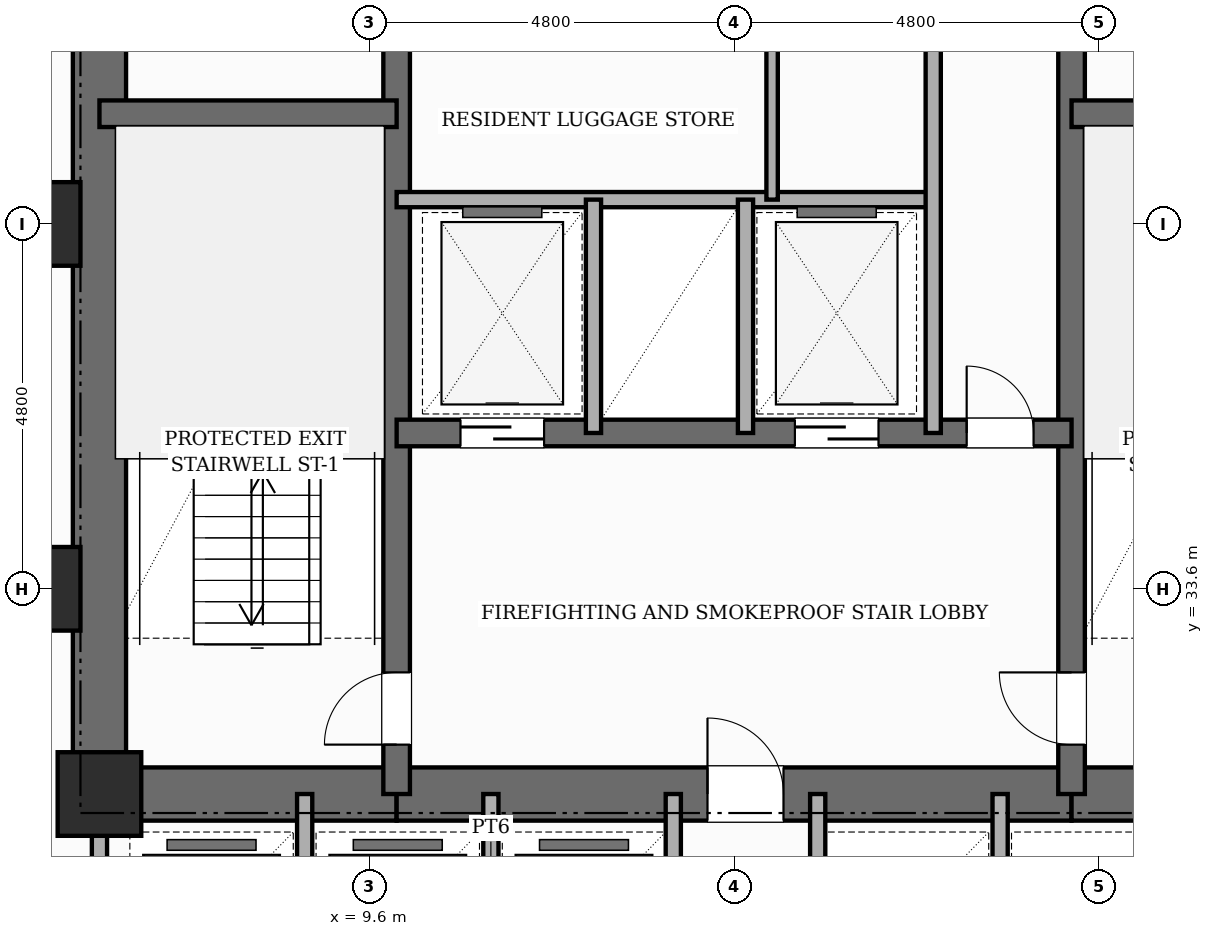
"""IFC4 building model, lengths in metres.
Left out: names, types, materials, properties, quantities, classifications, styles, units other than length and angle.
Written with IfcOpenShell. Run it as: python <this file> out.ifc"""

import sys

from ifc_helpers import new_model, si_unit, direction, frame, frame_2d, origin, origin_2d, place, context, subcontext, project, spatial, rectangle, extrude, element, fill, save


model = new_model("IFC4")
c1 = context("Model", 3, precision=1e-05, world=origin(), true_north=direction((0.0, 1.0)))
c2 = subcontext(c1, "Body", "Model", "MODEL_VIEW")
j1 = project(units=[si_unit("LENGTHUNIT", "METRE"), si_unit("PLANEANGLEUNIT", "RADIAN")], contexts=[c1])
p1 = place(None, origin())
s1 = spatial("IfcSite", under=j1, at=p1, CompositionType="ELEMENT")
p2 = place(p1, origin())
s2 = spatial("IfcBuilding", under=s1, at=p2, CompositionType="ELEMENT")
p3 = place(p2, frame((0.0, 0.0, 57.4)))
s3 = spatial("IfcBuildingStorey", under=s2, at=p3, CompositionType="ELEMENT", Elevation=57.4)
p4 = place(p3, frame((6.05, 30.55, 0.0), z_axis=(0.0, 0.0, 1.0), x_axis=(0.0, 1.0, 0.0)))
e1 = element("IfcWall", 1, at=p4, inside=s3, PredefinedType="SHEAR", context=c2, shape_type="SweptSolid", body=[
    extrude(rectangle(XDim=15.6, YDim=0.7, at=frame_2d((7.8, 0.0))), origin(), (0.0, 0.0, 1.0), 3.6),
])
p5 = place(p3, frame((6.05, 30.9, 0.0), z_axis=(0.0, 0.0, 1.0), x_axis=(1.0, 0.0, 0.0)))
e2 = element("IfcWall", 2, at=p5, inside=s3, PredefinedType="SHEAR", context=c2, shape_type="SweptSolid", body=[
    extrude(rectangle(XDim=3.91, YDim=0.7, at=frame_2d((1.955, 0.0))), origin(), (0.0, 0.0, 1.0), 3.6),
])
p6 = place(p3, frame((9.96, 30.9, 0.0), z_axis=(0.0, 0.0, 1.0), x_axis=(1.0, 0.0, 0.0)))
e3 = element("IfcWall", 3, at=p6, inside=s3, PredefinedType="SHEAR", context=c2, shape_type="SweptSolid", body=[
    extrude(rectangle(XDim=8.88, YDim=0.7, at=frame_2d((4.44, 0.0))), origin(), (0.0, 0.0, 1.0), 3.6),
])
p7 = place(p6, frame((4.09, 0.0, 0.0)))
e4 = element("IfcOpeningElement", 4, at=p7, cuts=e3, PredefinedType="OPENING", context=c2, shape_type="SweptSolid", body=[
    extrude(rectangle(XDim=1.0, YDim=2.15, at=frame_2d((0.5, 1.075))), frame((0.0, 0.36, 0.0), z_axis=(0.0, -1.0, 0.0), x_axis=(1.0, 0.0, 0.0)), (0.0, 0.0, 1.0), 0.72),
])
p8 = place(p3, frame((18.84, 30.9, 0.0), z_axis=(0.0, 0.0, 1.0), x_axis=(1.0, 0.0, 0.0)))
e5 = element("IfcWall", 5, at=p8, inside=s3, PredefinedType="SHEAR", context=c2, shape_type="SweptSolid", body=[
    extrude(rectangle(XDim=3.91, YDim=0.7, at=frame_2d((1.955, 0.0))), origin(), (0.0, 0.0, 1.0), 3.6),
])
p9 = place(p3, frame((9.96, 30.9, 0.0), z_axis=(0.0, 0.0, 1.0), x_axis=(0.0, 1.0, 0.0)))
e6 = element("IfcWall", 6, at=p9, inside=s3, PredefinedType="SHEAR", context=c2, shape_type="SweptSolid", body=[
    extrude(rectangle(XDim=14.9, YDim=0.35, at=frame_2d((7.45, 0.0))), origin(), (0.0, 0.0, 1.0), 3.6),
])
p10 = place(p9, frame((0.65, 0.0, 0.0)))
e7 = element("IfcOpeningElement", 7, at=p10, cuts=e6, PredefinedType="OPENING", context=c2, shape_type="SweptSolid", body=[
    extrude(rectangle(XDim=0.95, YDim=2.1, at=frame_2d((0.475, 1.05))), frame((0.0, 0.185, 0.0), z_axis=(0.0, -1.0, 0.0), x_axis=(1.0, 0.0, 0.0)), (0.0, 0.0, 1.0), 0.37),
])
p11 = place(p9, frame((10.45, 0.0, 0.0)))
e8 = element("IfcOpeningElement", 8, at=p11, cuts=e6, PredefinedType="OPENING", context=c2, shape_type="SweptSolid", body=[
    extrude(rectangle(XDim=1.0, YDim=2.15, at=frame_2d((0.5, 1.075))), frame((0.0, 0.185, 0.0), z_axis=(0.0, -1.0, 0.0), x_axis=(1.0, 0.0, 0.0)), (0.0, 0.0, 1.0), 0.37),
])
p12 = place(p3, frame((18.84, 30.9, 0.0), z_axis=(0.0, 0.0, 1.0), x_axis=(0.0, 1.0, 0.0)))
e9 = element("IfcWall", 9, at=p12, inside=s3, PredefinedType="SHEAR", context=c2, shape_type="SweptSolid", body=[
    extrude(rectangle(XDim=14.9, YDim=0.35, at=frame_2d((7.45, 0.0))), origin(), (0.0, 0.0, 1.0), 3.6),
])
p13 = place(p12, frame((0.65, 0.0, 0.0)))
e10 = element("IfcOpeningElement", 10, at=p13, cuts=e9, PredefinedType="OPENING", context=c2, shape_type="SweptSolid", body=[
    extrude(rectangle(XDim=0.95, YDim=2.1, at=frame_2d((0.475, 1.05))), frame((0.0, 0.185, 0.0), z_axis=(0.0, -1.0, 0.0), x_axis=(1.0, 0.0, 0.0)), (0.0, 0.0, 1.0), 0.37),
])
p14 = place(p12, frame((10.45, 0.0, 0.0)))
e11 = element("IfcOpeningElement", 11, at=p14, cuts=e9, PredefinedType="OPENING", context=c2, shape_type="SweptSolid", body=[
    extrude(rectangle(XDim=1.0, YDim=2.15, at=frame_2d((0.5, 1.075))), frame((0.0, 0.185, 0.0), z_axis=(0.0, -1.0, 0.0), x_axis=(1.0, 0.0, 0.0)), (0.0, 0.0, 1.0), 0.37),
])
for number, where, z_axis, x_axis in (
    (12, (6.05, 39.85, 0.0), (0.0, 0.0, 1.0), (1.0, 0.0, 0.0)),
    (13, (18.84, 39.85, 0.0), (0.0, 0.0, 1.0), (1.0, 0.0, 0.0)),
):
    element("IfcWall", number, at=place(p3, frame(where, z_axis=z_axis, x_axis=x_axis)), inside=s3, PredefinedType="SHEAR", context=c2, shape_type="SweptSolid", body=[
        extrude(rectangle(XDim=3.91, YDim=0.35, at=frame_2d((1.955, 0.0))), origin(), (0.0, 0.0, 1.0), 3.6),
    ])
p15 = place(p3, frame((9.96, 35.65, 0.0), z_axis=(0.0, 0.0, 1.0), x_axis=(1.0, 0.0, 0.0)))
e14 = element("IfcWall", 14, at=p15, inside=s3, PredefinedType="SHEAR", context=c2, shape_type="SweptSolid", body=[
    extrude(rectangle(XDim=8.88, YDim=0.35, at=frame_2d((4.44, 0.0))), origin(), (0.0, 0.0, 1.0), 3.6),
])
p16 = place(p15, frame((0.84, 0.0, 0.0)))
e15 = element("IfcOpeningElement", 15, at=p16, cuts=e14, PredefinedType="OPENING", context=c2, shape_type="SweptSolid", body=[
    extrude(rectangle(XDim=1.1, YDim=2.15, at=frame_2d((0.55, 1.075))), frame((0.0, 0.185, 0.0), z_axis=(0.0, -1.0, 0.0), x_axis=(1.0, 0.0, 0.0)), (0.0, 0.0, 1.0), 0.37),
])
p17 = place(p15, frame((5.24, 0.0, 0.0)))
e16 = element("IfcOpeningElement", 16, at=p17, cuts=e14, PredefinedType="OPENING", context=c2, shape_type="SweptSolid", body=[
    extrude(rectangle(XDim=1.1, YDim=2.15, at=frame_2d((0.55, 1.075))), frame((0.0, 0.185, 0.0), z_axis=(0.0, -1.0, 0.0), x_axis=(1.0, 0.0, 0.0)), (0.0, 0.0, 1.0), 0.37),
])
p18 = place(p15, frame((7.5, 0.0, 0.0)))
e17 = element("IfcOpeningElement", 17, at=p18, cuts=e14, PredefinedType="OPENING", context=c2, shape_type="SweptSolid", body=[
    extrude(rectangle(XDim=0.88, YDim=2.1, at=frame_2d((0.44, 1.05))), frame((0.0, 0.185, 0.0), z_axis=(0.0, -1.0, 0.0), x_axis=(1.0, 0.0, 0.0)), (0.0, 0.0, 1.0), 0.37),
])
for number, where, z_axis, x_axis in (
    (18, (5.25, 33.6, 0.0), (0.0, 0.0, 1.0), (1.0, 0.0, 0.0)),
    (19, (5.25, 38.4, 0.0), (0.0, 0.0, 1.0), (1.0, 0.0, 0.0)),
    (20, (6.05, 30.9, 0.0), (0.0, 0.0, 1.0), (1.0, 0.0, 0.0)),
):
    element("IfcColumn", number, at=place(p3, frame(where, z_axis=z_axis, x_axis=x_axis)), inside=s3, PredefinedType="COLUMN", context=c2, shape_type="SweptSolid", body=[
        extrude(rectangle(XDim=1.1, YDim=1.1, at=origin_2d()), origin(), (0.0, 0.0, 1.0), 3.6),
    ])
p19 = place(p3, frame((9.96, 38.72, 0.0), z_axis=(0.0, 0.0, 1.0), x_axis=(1.0, 0.0, 0.0)))
e21 = element("IfcWall", 21, at=p19, inside=s3, PredefinedType="POLYGONAL", context=c2, shape_type="SweptSolid", body=[
    extrude(rectangle(XDim=7.06, YDim=0.2, at=frame_2d((3.53, 0.0))), origin(), (0.0, 0.0, 1.0), 3.35),
])
for number, where, z_axis, x_axis in (
    (22, (12.55, 35.65, 0.0), (0.0, 0.0, 1.0), (0.0, 1.0, 0.0)),
    (23, (14.55, 35.65, 0.0), (0.0, 0.0, 1.0), (0.0, 1.0, 0.0)),
):
    element("IfcWall", number, at=place(p3, frame(where, z_axis=z_axis, x_axis=x_axis)), inside=s3, PredefinedType="POLYGONAL", context=c2, shape_type="SweptSolid", body=[
        extrude(rectangle(XDim=3.07, YDim=0.2, at=frame_2d((1.535, 0.0))), origin(), (0.0, 0.0, 1.0), 3.35),
    ])
p20 = place(p3, frame((17.02, 35.65, 0.0), z_axis=(0.0, 0.0, 1.0), x_axis=(0.0, 1.0, 0.0)))
e24 = element("IfcWall", 24, at=p20, inside=s3, PredefinedType="POLYGONAL", context=c2, shape_type="SweptSolid", body=[
    extrude(rectangle(XDim=5.15, YDim=0.2, at=frame_2d((2.575, 0.0))), origin(), (0.0, 0.0, 1.0), 3.35),
])
p21 = place(p3, frame((14.9, 38.72, 0.0), z_axis=(0.0, 0.0, 1.0), x_axis=(0.0, 1.0, 0.0)))
e25 = element("IfcWall", 25, at=p21, inside=s3, PredefinedType="PARTITIONING", context=c2, shape_type="SweptSolid", body=[
    extrude(rectangle(XDim=2.08, YDim=0.15, at=frame_2d((1.04, 0.0))), origin(), (0.0, 0.0, 1.0), 3.35),
])
p22 = place(p3, frame((6.05, 27.9, 0.0), z_axis=(0.0, 0.0, 1.0), x_axis=(0.0, 1.0, 0.0)))
e26 = element("IfcWall", 26, at=p22, inside=s3, PredefinedType="POLYGONAL", context=c2, shape_type="SweptSolid", body=[
    extrude(rectangle(XDim=3.0, YDim=0.2, at=frame_2d((1.5, 0.0))), origin(), (0.0, 0.0, 1.0), 3.35),
])
for number, where, z_axis, x_axis in (
    (27, (13.6, 28.0, 0.0), (0.0, 0.0, 1.0), (0.0, 1.0, 0.0)),
    (28, (15.5, 28.0, 0.0), (0.0, 0.0, 1.0), (0.0, 1.0, 0.0)),
    (29, (8.75, 28.0, 0.0), (0.0, 0.0, 1.0), (0.0, 1.0, 0.0)),
    (30, (11.2, 28.0, 0.0), (0.0, 0.0, 1.0), (0.0, 1.0, 0.0)),
    (31, (17.9, 28.0, 0.0), (0.0, 0.0, 1.0), (0.0, 1.0, 0.0)),
):
    element("IfcWall", number, at=place(p3, frame(where, z_axis=z_axis, x_axis=x_axis)), inside=s3, PredefinedType="POLYGONAL", context=c2, shape_type="SweptSolid", body=[
        extrude(rectangle(XDim=2.9, YDim=0.2, at=frame_2d((1.45, 0.0))), origin(), (0.0, 0.0, 1.0), 3.35),
    ])
p23 = place(p10, origin())
e32 = element("IfcDoor", 32, at=p23, inside=s3, OperationType="SINGLE_SWING_LEFT", PredefinedType="DOOR", context=c2, shape_type="SweptSolid", body=[
    extrude(rectangle(XDim=0.95, YDim=2.1, at=frame_2d((0.475, 1.05))), frame((0.0, 0.025, 0.0), z_axis=(0.0, -1.0, 0.0), x_axis=(1.0, 0.0, 0.0)), (0.0, 0.0, 1.0), 0.05),
])
fill(e7, e32)
p24 = place(p13, origin())
e33 = element("IfcDoor", 33, at=p24, inside=s3, OperationType="SINGLE_SWING_RIGHT", PredefinedType="DOOR", context=c2, shape_type="SweptSolid", body=[
    extrude(rectangle(XDim=0.95, YDim=2.1, at=frame_2d((0.475, 1.05))), frame((0.0, 0.025, 0.0), z_axis=(0.0, -1.0, 0.0), x_axis=(1.0, 0.0, 0.0)), (0.0, 0.0, 1.0), 0.05),
])
fill(e10, e33)
p25 = place(p7, origin())
e34 = element("IfcDoor", 34, at=p25, inside=s3, OperationType="SINGLE_SWING_LEFT", PredefinedType="DOOR", context=c2, shape_type="SweptSolid", body=[
    extrude(rectangle(XDim=1.0, YDim=2.15, at=frame_2d((0.5, 1.075))), frame((0.0, 0.025, 0.0), z_axis=(0.0, -1.0, 0.0), x_axis=(1.0, 0.0, 0.0)), (0.0, 0.0, 1.0), 0.05),
])
fill(e4, e34)
p26 = place(p16, origin())
e35 = element("IfcDoor", 35, at=p26, inside=s3, OperationType="SLIDING_TO_LEFT", PredefinedType="DOOR", context=c2, shape_type="SweptSolid", body=[
    extrude(rectangle(XDim=1.1, YDim=2.15, at=frame_2d((0.55, 1.075))), frame((0.0, 0.025, 0.0), z_axis=(0.0, -1.0, 0.0), x_axis=(1.0, 0.0, 0.0)), (0.0, 0.0, 1.0), 0.05),
])
fill(e15, e35)
p27 = place(p17, origin())
e36 = element("IfcDoor", 36, at=p27, inside=s3, OperationType="SLIDING_TO_RIGHT", PredefinedType="DOOR", context=c2, shape_type="SweptSolid", body=[
    extrude(rectangle(XDim=1.1, YDim=2.15, at=frame_2d((0.55, 1.075))), frame((0.0, 0.025, 0.0), z_axis=(0.0, -1.0, 0.0), x_axis=(1.0, 0.0, 0.0)), (0.0, 0.0, 1.0), 0.05),
])
fill(e16, e36)
p28 = place(p18, origin())
e37 = element("IfcDoor", 37, at=p28, inside=s3, OperationType="SINGLE_SWING_LEFT", PredefinedType="DOOR", context=c2, shape_type="SweptSolid", body=[
    extrude(rectangle(XDim=0.88, YDim=2.1, at=frame_2d((0.44, 1.05))), frame((0.0, 0.025, 0.0), z_axis=(0.0, -1.0, 0.0), x_axis=(1.0, 0.0, 0.0)), (0.0, 0.0, 1.0), 0.05),
])
fill(e17, e37)
save(model, sys.argv[1])
